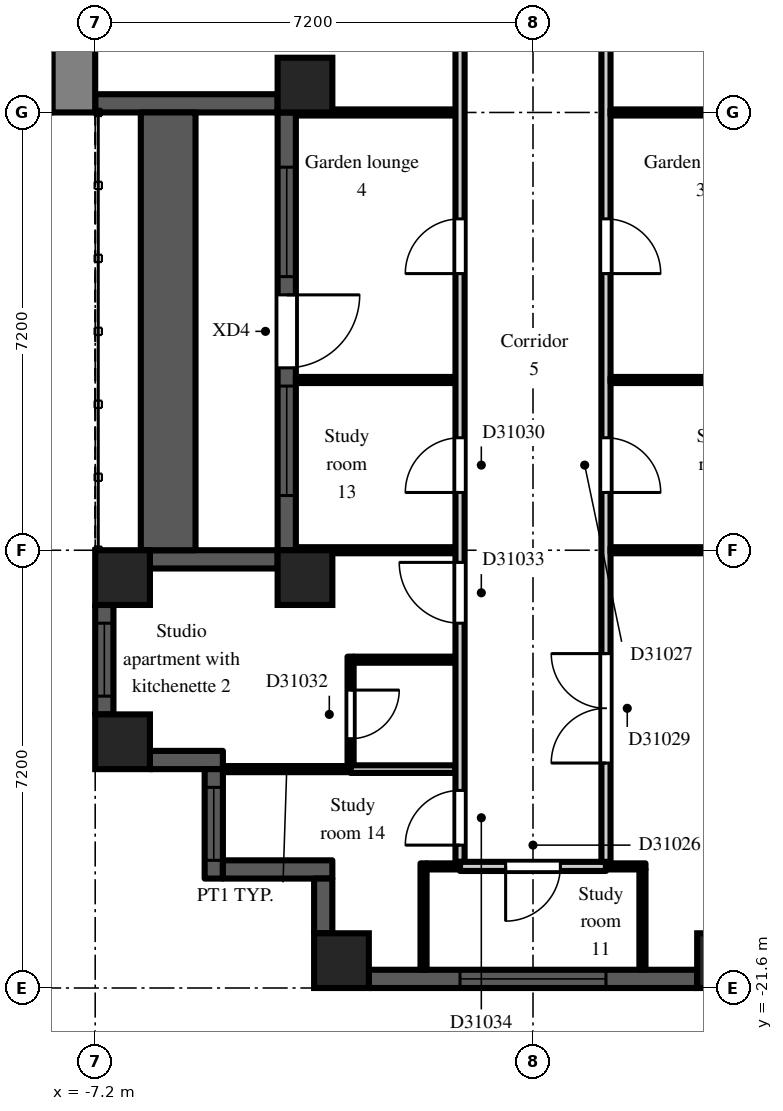
"""IFC4 building model, lengths in metres.
Left out: names, types, materials, properties, quantities, classifications, styles, units other than length and angle.
Written with IfcOpenShell. Run it as: python <this file> out.ifc"""

import sys

from ifc_helpers import new_model, si_unit, direction, frame, frame_2d, origin, origin_2d, place, context, subcontext, project, spatial, rectangle, extrude, element, fill, save


model = new_model("IFC4")
c1 = context("Model", 3, precision=1e-05, world=origin(), true_north=direction((0.0, 1.0)))
c2 = subcontext(c1, "Body", "Model", "MODEL_VIEW")
j1 = project(units=[si_unit("LENGTHUNIT", "METRE"), si_unit("PLANEANGLEUNIT", "RADIAN")], contexts=[c1])
p1 = place(None, origin())
s1 = spatial("IfcSite", under=j1, at=p1, CompositionType="ELEMENT")
p2 = place(p1, origin())
s2 = spatial("IfcBuilding", under=s1, at=p2, CompositionType="ELEMENT")
p3 = place(p2, frame((0.0, 0.0, 216.9)))
s3 = spatial("IfcBuildingStorey", under=s2, at=p3, CompositionType="ELEMENT", Elevation=216.9)
for number, where, z_axis, x_axis in (
    (1, (-6.75, -17.55, 0.0), (0.0, 0.0, 1.0), (1.0, 0.0, 0.0)),
    (2, (-6.75, -14.85, 0.0), (0.0, 0.0, 1.0), (1.0, 0.0, 0.0)),
    (3, (-3.75, -14.85, 0.0), (0.0, 0.0, 1.0), (1.0, 0.0, 0.0)),
    (4, (-3.75, -6.75, 0.0), (0.0, 0.0, 1.0), (1.0, 0.0, 0.0)),
    (5, (-3.15, -21.15, 0.0), (0.0, 0.0, 1.0), (1.0, 0.0, 0.0)),
    (6, (3.15, -21.15, 0.0), (0.0, 0.0, 1.0), (1.0, 0.0, 0.0)),
):
    element("IfcColumn", number, at=place(p3, frame(where, z_axis=z_axis, x_axis=x_axis)), inside=s3, PredefinedType="COLUMN", context=c2, shape_type="SweptSolid", body=[
        extrude(rectangle(XDim=0.9, YDim=0.9, at=origin_2d()), origin(), (0.0, 0.0, 1.0), 3.0),
    ])
p4 = place(p3, frame((-7.2, -7.05, 0.0), z_axis=(0.0, 0.0, 1.0), x_axis=(1.0, 0.0, 0.0)))
e7 = element("IfcWall", 7, at=p4, inside=s3, PredefinedType="SOLIDWALL", context=c2, shape_type="SweptSolid", body=[
    extrude(rectangle(XDim=3.0, YDim=0.3, at=frame_2d((1.5, 0.0))), origin(), (0.0, 0.0, 1.0), 2.3),
])
p5 = place(p3, frame((-4.05, -7.2, 0.0), z_axis=(0.0, 0.0, 1.0), x_axis=(0.0, -1.0, 0.0)))
e8 = element("IfcWall", 8, at=p5, inside=s3, PredefinedType="SOLIDWALL", context=c2, shape_type="SweptSolid", body=[
    extrude(rectangle(XDim=7.2, YDim=0.3, at=frame_2d((3.6, 0.0))), origin(), (0.0, 0.0, 1.0), 2.3),
])
p6 = place(p5, frame((3.0, 0.0, 0.0)))
e9 = element("IfcOpeningElement", 9, at=p6, cuts=e8, PredefinedType="OPENING", context=c2, shape_type="SweptSolid", body=[
    extrude(rectangle(XDim=1.2, YDim=2.05, at=frame_2d((0.6, 1.025))), frame((0.0, 0.16, 0.0), z_axis=(0.0, -1.0, 0.0), x_axis=(1.0, 0.0, 0.0)), (0.0, 0.0, 1.0), 0.32),
])
p7 = place(p5, frame((0.9, 0.0, 0.2)))
e10 = element("IfcOpeningElement", 10, at=p7, cuts=e8, PredefinedType="OPENING", context=c2, shape_type="SweptSolid", body=[
    extrude(rectangle(XDim=1.8, YDim=1.85, at=frame_2d((0.9, 0.925))), frame((0.0, 0.16, 0.0), z_axis=(0.0, -1.0, 0.0), x_axis=(1.0, 0.0, 0.0)), (0.0, 0.0, 1.0), 0.32),
])
p8 = place(p5, frame((4.5, 0.0, 0.2)))
e11 = element("IfcOpeningElement", 11, at=p8, cuts=e8, PredefinedType="OPENING", context=c2, shape_type="SweptSolid", body=[
    extrude(rectangle(XDim=1.8, YDim=1.85, at=frame_2d((0.9, 0.925))), frame((0.0, 0.16, 0.0), z_axis=(0.0, -1.0, 0.0), x_axis=(1.0, 0.0, 0.0)), (0.0, 0.0, 1.0), 0.32),
])
p9 = place(p3, frame((-4.2, -14.55, 0.0), z_axis=(0.0, 0.0, 1.0), x_axis=(-1.0, 0.0, 0.0)))
e12 = element("IfcWall", 12, at=p9, inside=s3, PredefinedType="SOLIDWALL", context=c2, shape_type="SweptSolid", body=[
    extrude(rectangle(XDim=2.1, YDim=0.3, at=frame_2d((1.05, 0.0))), origin(), (0.0, 0.0, 1.0), 2.3),
])
p10 = place(p3, frame((-7.05, -15.3, 0.0), z_axis=(0.0, 0.0, 1.0), x_axis=(0.0, -1.0, 0.0)))
e13 = element("IfcWall", 13, at=p10, inside=s3, PredefinedType="SOLIDWALL", context=c2, shape_type="SweptSolid", body=[
    extrude(rectangle(XDim=1.8, YDim=0.3, at=frame_2d((0.9, 0.0))), origin(), (0.0, 0.0, 1.0), 2.3),
])
p11 = place(p10, frame((0.3, 0.0, 0.2)))
e14 = element("IfcOpeningElement", 14, at=p11, cuts=e13, PredefinedType="OPENING", context=c2, shape_type="SweptSolid", body=[
    extrude(rectangle(XDim=1.2, YDim=1.85, at=frame_2d((0.6, 0.925))), frame((0.0, 0.16, 0.0), z_axis=(0.0, -1.0, 0.0), x_axis=(1.0, 0.0, 0.0)), (0.0, 0.0, 1.0), 0.32),
])
p12 = place(p3, frame((-6.3, -17.85, 0.0), z_axis=(0.0, 0.0, 1.0), x_axis=(1.0, 0.0, 0.0)))
e15 = element("IfcWall", 15, at=p12, inside=s3, PredefinedType="SOLIDWALL", context=c2, shape_type="SweptSolid", body=[
    extrude(rectangle(XDim=1.2, YDim=0.3, at=frame_2d((0.6, 0.0))), origin(), (0.0, 0.0, 1.0), 2.6),
])
p13 = place(p3, frame((-5.25, -18.0, 0.0), z_axis=(0.0, 0.0, 1.0), x_axis=(0.0, -1.0, 0.0)))
e16 = element("IfcWall", 16, at=p13, inside=s3, PredefinedType="SOLIDWALL", context=c2, shape_type="SweptSolid", body=[
    extrude(rectangle(XDim=1.8, YDim=0.3, at=frame_2d((0.9, 0.0))), origin(), (0.0, 0.0, 1.0), 2.6),
])
p14 = place(p13, frame((0.3, 0.0, 0.2)))
e17 = element("IfcOpeningElement", 17, at=p14, cuts=e16, PredefinedType="OPENING", context=c2, shape_type="SweptSolid", body=[
    extrude(rectangle(XDim=1.2, YDim=1.85, at=frame_2d((0.6, 0.925))), frame((0.0, 0.16, 0.0), z_axis=(0.0, -1.0, 0.0), x_axis=(1.0, 0.0, 0.0)), (0.0, 0.0, 1.0), 0.32),
])
p15 = place(p3, frame((-5.1, -19.65, 0.0), z_axis=(0.0, 0.0, 1.0), x_axis=(1.0, 0.0, 0.0)))
e18 = element("IfcWall", 18, at=p15, inside=s3, PredefinedType="SOLIDWALL", context=c2, shape_type="SweptSolid", body=[
    extrude(rectangle(XDim=1.8, YDim=0.3, at=frame_2d((0.9, 0.0))), origin(), (0.0, 0.0, 1.0), 2.6),
])
p16 = place(p3, frame((-3.45, -19.8, 0.0), z_axis=(0.0, 0.0, 1.0), x_axis=(0.0, -1.0, 0.0)))
e19 = element("IfcWall", 19, at=p16, inside=s3, PredefinedType="SOLIDWALL", context=c2, shape_type="SweptSolid", body=[
    extrude(rectangle(XDim=0.9, YDim=0.3, at=frame_2d((0.45, 0.0))), origin(), (0.0, 0.0, 1.0), 2.6),
])
p17 = place(p3, frame((-2.7, -21.45, 0.0), z_axis=(0.0, 0.0, 1.0), x_axis=(1.0, 0.0, 0.0)))
e20 = element("IfcWall", 20, at=p17, inside=s3, PredefinedType="SOLIDWALL", context=c2, shape_type="SweptSolid", body=[
    extrude(rectangle(XDim=5.4, YDim=0.3, at=frame_2d((2.7, 0.0))), origin(), (0.0, 0.0, 1.0), 2.3),
])
p18 = place(p17, frame((1.5, 0.0, 0.2)))
e21 = element("IfcOpeningElement", 21, at=p18, cuts=e20, PredefinedType="OPENING", context=c2, shape_type="SweptSolid", body=[
    extrude(rectangle(XDim=2.4, YDim=1.85, at=frame_2d((1.2, 0.925))), frame((0.0, 0.16, 0.0), z_axis=(0.0, -1.0, 0.0), x_axis=(1.0, 0.0, 0.0)), (0.0, 0.0, 1.0), 0.32),
])
p19 = place(p3, frame((-6.0, -14.4, 0.0), z_axis=(0.0, 0.0, 1.0), x_axis=(0.0, 1.0, 0.0)))
e22 = element("IfcWall", 22, at=p19, inside=s3, PredefinedType="PARAPET", context=c2, shape_type="SweptSolid", body=[
    extrude(rectangle(XDim=7.2, YDim=0.9, at=frame_2d((3.6, 0.0))), origin(), (0.0, 0.0, 1.0), 0.8),
])
p20 = place(p3, frame((-7.55, -7.2, 0.0), z_axis=(0.0, 0.0, 1.0), x_axis=(0.0, 1.0, 0.0)))
e23 = element("IfcWall", 23, at=p20, inside=s3, PredefinedType="SHEAR", context=c2, shape_type="SweptSolid", body=[
    extrude(rectangle(XDim=14.4, YDim=0.7, at=frame_2d((7.2, 0.0))), origin(), (0.0, 0.0, 1.0), 2.6),
])
p21 = place(p20, frame((6.0, 0.0, 0.0)))
e24 = element("IfcOpeningElement", 24, at=p21, cuts=e23, PredefinedType="OPENING", context=c2, shape_type="SweptSolid", body=[
    extrude(rectangle(XDim=2.4, YDim=2.2, at=frame_2d((1.2, 1.1))), frame((0.0, 0.36, 0.0), z_axis=(0.0, -1.0, 0.0), x_axis=(1.0, 0.0, 0.0)), (0.0, 0.0, 1.0), 0.72),
])
p22 = place(p3, frame((-5.1, -18.0, 0.0), z_axis=(0.0, 0.0, 1.0), x_axis=(1.0, 0.0, 0.0)))
e25 = element("IfcWall", 25, at=p22, inside=s3, PredefinedType="PARTITIONING", context=c2, shape_type="SweptSolid", body=[
    extrude(rectangle(XDim=2.1, YDim=0.1, at=frame_2d((1.05, 0.0))), origin(), (0.0, 0.0, 1.0), 2.6),
])
for number, where, z_axis, x_axis in (
    (26, (-3.9, -14.4, 0.0), (0.0, 0.0, 1.0), (1.0, 0.0, 0.0)),
    (27, (-3.9, -11.6, 0.0), (0.0, 0.0, 1.0), (1.0, 0.0, 0.0)),
    (28, (-3.9, -7.2, 0.0), (0.0, 0.0, 1.0), (1.0, 0.0, 0.0)),
):
    element("IfcWall", number, at=place(p3, frame(where, z_axis=z_axis, x_axis=x_axis)), inside=s3, PredefinedType="PARTITIONING", context=c2, shape_type="SweptSolid", body=[
        extrude(rectangle(XDim=2.625, YDim=0.1, at=frame_2d((1.312, 0.0))), origin(), (0.0, 0.0, 1.0), 2.6),
    ])
p23 = place(p3, frame((-3.0, -17.938, 0.0), z_axis=(0.0, 0.0, 1.0), x_axis=(0.0, 1.0, 0.0)))
e29 = element("IfcWall", 29, at=p23, inside=s3, PredefinedType="PARTITIONING", context=c2, shape_type="SweptSolid", body=[
    extrude(rectangle(XDim=1.788, YDim=0.1, at=frame_2d((0.894, 0.0))), origin(), (0.0, 0.0, 1.0), 2.6),
])
p24 = place(p23, frame((0.438, 0.0, 0.0)))
e30 = element("IfcOpeningElement", 30, at=p24, cuts=e29, PredefinedType="OPENING", context=c2, shape_type="SweptSolid", body=[
    extrude(rectangle(XDim=0.8, YDim=2.1, at=frame_2d((0.4, 1.05))), frame((0.0, 0.06, 0.0), z_axis=(0.0, -1.0, 0.0), x_axis=(1.0, 0.0, 0.0)), (0.0, 0.0, 1.0), 0.12),
])
p25 = place(p3, frame((-3.0, -18.0, 0.0), z_axis=(0.0, 0.0, 1.0), x_axis=(1.0, 0.0, 0.0)))
e31 = element("IfcWall", 31, at=p25, inside=s3, PredefinedType="PARTITIONING", context=c2, shape_type="SweptSolid", body=[
    extrude(rectangle(XDim=1.725, YDim=0.125, at=frame_2d((0.863, 0.0))), origin(), (0.0, 0.0, 1.0), 2.6),
])
p26 = place(p3, frame((-2.95, -16.2, 0.0), z_axis=(0.0, 0.0, 1.0), x_axis=(1.0, 0.0, 0.0)))
e32 = element("IfcWall", 32, at=p26, inside=s3, PredefinedType="PARTITIONING", context=c2, shape_type="SweptSolid", body=[
    extrude(rectangle(XDim=1.675, YDim=0.1, at=frame_2d((0.837, 0.0))), origin(), (0.0, 0.0, 1.0), 2.6),
])
p27 = place(p3, frame((-1.8, -21.3, 0.0), z_axis=(0.0, 0.0, 1.0), x_axis=(0.0, 1.0, 0.0)))
e33 = element("IfcWall", 33, at=p27, inside=s3, PredefinedType="PARTITIONING", context=c2, shape_type="SweptSolid", body=[
    extrude(rectangle(XDim=1.75, YDim=0.1, at=frame_2d((0.875, 0.0))), origin(), (0.0, 0.0, 1.0), 2.6),
])
p28 = place(p3, frame((-1.75, -19.6, 0.0), z_axis=(0.0, 0.0, 1.0), x_axis=(1.0, 0.0, 0.0)))
e34 = element("IfcWall", 34, at=p28, inside=s3, PredefinedType="PARTITIONING", context=c2, shape_type="SweptSolid", body=[
    extrude(rectangle(XDim=0.55, YDim=0.1, at=frame_2d((0.275, 0.0))), origin(), (0.0, 0.0, 1.0), 2.6),
])
p29 = place(p3, frame((-1.2, -19.525, 0.0), z_axis=(0.0, 0.0, 1.0), x_axis=(0.0, 1.0, 0.0)))
e35 = element("IfcWall", 35, at=p29, inside=s3, PredefinedType="PARTITIONING", context=c2, shape_type="SweptSolid", body=[
    extrude(rectangle(XDim=18.25, YDim=0.15, at=frame_2d((9.125, 0.0))), origin(), (0.0, 0.0, 1.0), 2.6),
])
p30 = place(p29, frame((13.375, 0.0, 0.0)))
e36 = element("IfcOpeningElement", 36, at=p30, cuts=e35, PredefinedType="OPENING", context=c2, shape_type="SweptSolid", body=[
    extrude(rectangle(XDim=0.9, YDim=2.1, at=frame_2d((0.45, 1.05))), frame((0.0, 0.085, 0.0), z_axis=(0.0, -1.0, 0.0), x_axis=(1.0, 0.0, 0.0)), (0.0, 0.0, 1.0), 0.17),
])
p31 = place(p29, frame((6.075, 0.0, 0.0)))
e37 = element("IfcOpeningElement", 37, at=p31, cuts=e35, PredefinedType="OPENING", context=c2, shape_type="SweptSolid", body=[
    extrude(rectangle(XDim=0.9, YDim=2.1, at=frame_2d((0.45, 1.05))), frame((0.0, 0.085, 0.0), z_axis=(0.0, -1.0, 0.0), x_axis=(1.0, 0.0, 0.0)), (0.0, 0.0, 1.0), 0.17),
])
p32 = place(p29, frame((9.675, 0.0, 0.0)))
e38 = element("IfcOpeningElement", 38, at=p32, cuts=e35, PredefinedType="OPENING", context=c2, shape_type="SweptSolid", body=[
    extrude(rectangle(XDim=0.9, YDim=2.1, at=frame_2d((0.45, 1.05))), frame((0.0, 0.085, 0.0), z_axis=(0.0, -1.0, 0.0), x_axis=(1.0, 0.0, 0.0)), (0.0, 0.0, 1.0), 0.17),
])
p33 = place(p29, frame((3.925, 0.0, 0.0)))
e39 = element("IfcOpeningElement", 39, at=p33, cuts=e35, PredefinedType="OPENING", context=c2, shape_type="SweptSolid", body=[
    extrude(rectangle(XDim=1.0, YDim=2.1, at=frame_2d((0.5, 1.05))), frame((0.0, 0.085, 0.0), z_axis=(0.0, -1.0, 0.0), x_axis=(1.0, 0.0, 0.0)), (0.0, 0.0, 1.0), 0.17),
])
p34 = place(p29, frame((0.275, 0.0, 0.0)))
e40 = element("IfcOpeningElement", 40, at=p34, cuts=e35, PredefinedType="OPENING", context=c2, shape_type="SweptSolid", body=[
    extrude(rectangle(XDim=0.9, YDim=2.1, at=frame_2d((0.45, 1.05))), frame((0.0, 0.085, 0.0), z_axis=(0.0, -1.0, 0.0), x_axis=(1.0, 0.0, 0.0)), (0.0, 0.0, 1.0), 0.17),
])
p35 = place(p3, frame((-1.2, -19.6, 0.0), z_axis=(0.0, 0.0, 1.0), x_axis=(1.0, 0.0, 0.0)))
e41 = element("IfcWall", 41, at=p35, inside=s3, PredefinedType="PARTITIONING", context=c2, shape_type="SweptSolid", body=[
    extrude(rectangle(XDim=2.4, YDim=0.15, at=frame_2d((1.2, 0.0))), origin(), (0.0, 0.0, 1.0), 2.6),
])
p36 = place(p35, frame((0.75, 0.0, 0.0)))
e42 = element("IfcOpeningElement", 42, at=p36, cuts=e41, PredefinedType="OPENING", context=c2, shape_type="SweptSolid", body=[
    extrude(rectangle(XDim=0.9, YDim=2.1, at=frame_2d((0.45, 1.05))), frame((0.0, 0.085, 0.0), z_axis=(0.0, -1.0, 0.0), x_axis=(1.0, 0.0, 0.0)), (0.0, 0.0, 1.0), 0.17),
])
p37 = place(p3, frame((1.2, -19.525, 0.0), z_axis=(0.0, 0.0, 1.0), x_axis=(0.0, 1.0, 0.0)))
e43 = element("IfcWall", 43, at=p37, inside=s3, PredefinedType="PARTITIONING", context=c2, shape_type="SweptSolid", body=[
    extrude(rectangle(XDim=18.4, YDim=0.15, at=frame_2d((9.2, 0.0))), origin(), (0.0, 0.0, 1.0), 2.6),
])
p38 = place(p37, frame((14.875, 0.0, 0.0)))
e44 = element("IfcOpeningElement", 44, at=p38, cuts=e43, PredefinedType="OPENING", context=c2, shape_type="SweptSolid", body=[
    extrude(rectangle(XDim=0.9, YDim=2.1, at=frame_2d((0.45, 1.05))), frame((0.0, 0.085, 0.0), z_axis=(0.0, -1.0, 0.0), x_axis=(1.0, 0.0, 0.0)), (0.0, 0.0, 1.0), 0.17),
])
p39 = place(p37, frame((6.075, 0.0, 0.0)))
e45 = element("IfcOpeningElement", 45, at=p39, cuts=e43, PredefinedType="OPENING", context=c2, shape_type="SweptSolid", body=[
    extrude(rectangle(XDim=0.9, YDim=2.1, at=frame_2d((0.45, 1.05))), frame((0.0, 0.085, 0.0), z_axis=(0.0, -1.0, 0.0), x_axis=(1.0, 0.0, 0.0)), (0.0, 0.0, 1.0), 0.17),
])
p40 = place(p37, frame((9.675, 0.0, 0.0)))
e46 = element("IfcOpeningElement", 46, at=p40, cuts=e43, PredefinedType="OPENING", context=c2, shape_type="SweptSolid", body=[
    extrude(rectangle(XDim=0.9, YDim=2.1, at=frame_2d((0.45, 1.05))), frame((0.0, 0.085, 0.0), z_axis=(0.0, -1.0, 0.0), x_axis=(1.0, 0.0, 0.0)), (0.0, 0.0, 1.0), 0.17),
])
p41 = place(p37, frame((1.625, 0.0, 0.0)))
e47 = element("IfcOpeningElement", 47, at=p41, cuts=e43, PredefinedType="OPENING", context=c2, shape_type="SweptSolid", body=[
    extrude(rectangle(XDim=1.8, YDim=2.1, at=frame_2d((0.9, 1.05))), frame((0.0, 0.085, 0.0), z_axis=(0.0, -1.0, 0.0), x_axis=(1.0, 0.0, 0.0)), (0.0, 0.0, 1.0), 0.17),
])
p42 = place(p3, frame((1.2, -19.6, 0.0), z_axis=(0.0, 0.0, 1.0), x_axis=(1.0, 0.0, 0.0)))
e48 = element("IfcWall", 48, at=p42, inside=s3, PredefinedType="PARTITIONING", context=c2, shape_type="SweptSolid", body=[
    extrude(rectangle(XDim=0.65, YDim=0.1, at=frame_2d((0.325, 0.0))), origin(), (0.0, 0.0, 1.0), 2.6),
])
for number, where, z_axis, x_axis in (
    (49, (1.275, -14.4, 0.0), (0.0, 0.0, 1.0), (1.0, 0.0, 0.0)),
    (50, (1.275, -11.6, 0.0), (0.0, 0.0, 1.0), (1.0, 0.0, 0.0)),
    (51, (1.275, -7.2, 0.0), (0.0, 0.0, 1.0), (1.0, 0.0, 0.0)),
):
    element("IfcWall", number, at=place(p3, frame(where, z_axis=z_axis, x_axis=x_axis)), inside=s3, PredefinedType="PARTITIONING", context=c2, shape_type="SweptSolid", body=[
        extrude(rectangle(XDim=2.625, YDim=0.1, at=frame_2d((1.312, 0.0))), origin(), (0.0, 0.0, 1.0), 2.6),
    ])
p43 = place(p3, frame((1.8, -21.3, 0.0), z_axis=(0.0, 0.0, 1.0), x_axis=(0.0, 1.0, 0.0)))
e52 = element("IfcWall", 52, at=p43, inside=s3, PredefinedType="PARTITIONING", context=c2, shape_type="SweptSolid", body=[
    extrude(rectangle(XDim=1.65, YDim=0.1, at=frame_2d((0.825, 0.0))), origin(), (0.0, 0.0, 1.0), 2.6),
])
p44 = place(p6, origin())
e53 = element("IfcDoor", 53, at=p44, inside=s3, OperationType="SINGLE_SWING_LEFT", PredefinedType="DOOR", context=c2, shape_type="SweptSolid", body=[
    extrude(rectangle(XDim=1.2, YDim=2.05, at=frame_2d((0.6, 1.025))), frame((0.0, 0.025, 0.0), z_axis=(0.0, -1.0, 0.0), x_axis=(1.0, 0.0, 0.0)), (0.0, 0.0, 1.0), 0.05),
])
fill(e9, e53)
p45 = place(p7, origin())
e54 = element("IfcWindow", 54, at=p45, inside=s3, PartitioningType="SINGLE_PANEL", PredefinedType="WINDOW", context=c2, shape_type="SweptSolid", body=[
    extrude(rectangle(XDim=1.8, YDim=1.85, at=frame_2d((0.9, 0.925))), frame((0.0, 0.03, 0.0), z_axis=(0.0, -1.0, 0.0), x_axis=(1.0, 0.0, 0.0)), (0.0, 0.0, 1.0), 0.06),
])
fill(e10, e54)
p46 = place(p8, origin())
e55 = element("IfcWindow", 55, at=p46, inside=s3, PartitioningType="SINGLE_PANEL", PredefinedType="WINDOW", context=c2, shape_type="SweptSolid", body=[
    extrude(rectangle(XDim=1.8, YDim=1.85, at=frame_2d((0.9, 0.925))), frame((0.0, 0.03, 0.0), z_axis=(0.0, -1.0, 0.0), x_axis=(1.0, 0.0, 0.0)), (0.0, 0.0, 1.0), 0.06),
])
fill(e11, e55)
p47 = place(p11, origin())
e56 = element("IfcWindow", 56, at=p47, inside=s3, PartitioningType="SINGLE_PANEL", PredefinedType="WINDOW", context=c2, shape_type="SweptSolid", body=[
    extrude(rectangle(XDim=1.2, YDim=1.85, at=frame_2d((0.6, 0.925))), frame((0.0, 0.03, 0.0), z_axis=(0.0, -1.0, 0.0), x_axis=(1.0, 0.0, 0.0)), (0.0, 0.0, 1.0), 0.06),
])
fill(e14, e56)
p48 = place(p14, origin())
e57 = element("IfcWindow", 57, at=p48, inside=s3, PartitioningType="SINGLE_PANEL", PredefinedType="WINDOW", context=c2, shape_type="SweptSolid", body=[
    extrude(rectangle(XDim=1.2, YDim=1.85, at=frame_2d((0.6, 0.925))), frame((0.0, 0.03, 0.0), z_axis=(0.0, -1.0, 0.0), x_axis=(1.0, 0.0, 0.0)), (0.0, 0.0, 1.0), 0.06),
])
fill(e17, e57)
p49 = place(p18, origin())
e58 = element("IfcWindow", 58, at=p49, inside=s3, PartitioningType="SINGLE_PANEL", PredefinedType="WINDOW", context=c2, shape_type="SweptSolid", body=[
    extrude(rectangle(XDim=2.4, YDim=1.85, at=frame_2d((1.2, 0.925))), frame((0.0, 0.03, 0.0), z_axis=(0.0, -1.0, 0.0), x_axis=(1.0, 0.0, 0.0)), (0.0, 0.0, 1.0), 0.06),
])
fill(e21, e58)
p50 = place(p36, frame((0.9, 0.0, 0.0), z_axis=(0.0, 0.0, 1.0), x_axis=(-1.0, 0.0, 0.0)))
e59 = element("IfcDoor", 59, at=p50, inside=s3, OperationType="SINGLE_SWING_RIGHT", PredefinedType="DOOR", context=c2, shape_type="SweptSolid", body=[
    extrude(rectangle(XDim=0.9, YDim=2.1, at=frame_2d((0.45, 1.05))), frame((0.0, 0.025, 0.0), z_axis=(0.0, -1.0, 0.0), x_axis=(1.0, 0.0, 0.0)), (0.0, 0.0, 1.0), 0.05),
])
fill(e42, e59)
p51 = place(p39, frame((0.9, 0.0, 0.0), z_axis=(0.0, 0.0, 1.0), x_axis=(-1.0, 0.0, 0.0)))
e60 = element("IfcDoor", 60, at=p51, inside=s3, OperationType="SINGLE_SWING_RIGHT", PredefinedType="DOOR", context=c2, shape_type="SweptSolid", body=[
    extrude(rectangle(XDim=0.9, YDim=2.1, at=frame_2d((0.45, 1.05))), frame((0.0, 0.025, 0.0), z_axis=(0.0, -1.0, 0.0), x_axis=(1.0, 0.0, 0.0)), (0.0, 0.0, 1.0), 0.05),
])
fill(e45, e60)
p52 = place(p40, frame((0.9, 0.0, 0.0), z_axis=(0.0, 0.0, 1.0), x_axis=(-1.0, 0.0, 0.0)))
e61 = element("IfcDoor", 61, at=p52, inside=s3, OperationType="SINGLE_SWING_RIGHT", PredefinedType="DOOR", context=c2, shape_type="SweptSolid", body=[
    extrude(rectangle(XDim=0.9, YDim=2.1, at=frame_2d((0.45, 1.05))), frame((0.0, 0.025, 0.0), z_axis=(0.0, -1.0, 0.0), x_axis=(1.0, 0.0, 0.0)), (0.0, 0.0, 1.0), 0.05),
])
fill(e46, e61)
p53 = place(p41, origin())
e62 = element("IfcDoor", 62, at=p53, inside=s3, OperationType="DOUBLE_DOOR_DOUBLE_SWING", PredefinedType="DOOR", context=c2, shape_type="SweptSolid", body=[
    extrude(rectangle(XDim=1.8, YDim=2.1, at=frame_2d((0.9, 1.05))), frame((0.0, 0.025, 0.0), z_axis=(0.0, -1.0, 0.0), x_axis=(1.0, 0.0, 0.0)), (0.0, 0.0, 1.0), 0.05),
])
fill(e47, e62)
p54 = place(p31, origin())
e63 = element("IfcDoor", 63, at=p54, inside=s3, OperationType="SINGLE_SWING_LEFT", PredefinedType="DOOR", context=c2, shape_type="SweptSolid", body=[
    extrude(rectangle(XDim=0.9, YDim=2.1, at=frame_2d((0.45, 1.05))), frame((0.0, 0.025, 0.0), z_axis=(0.0, -1.0, 0.0), x_axis=(1.0, 0.0, 0.0)), (0.0, 0.0, 1.0), 0.05),
])
fill(e37, e63)
p55 = place(p32, origin())
e64 = element("IfcDoor", 64, at=p55, inside=s3, OperationType="SINGLE_SWING_LEFT", PredefinedType="DOOR", context=c2, shape_type="SweptSolid", body=[
    extrude(rectangle(XDim=0.9, YDim=2.1, at=frame_2d((0.45, 1.05))), frame((0.0, 0.025, 0.0), z_axis=(0.0, -1.0, 0.0), x_axis=(1.0, 0.0, 0.0)), (0.0, 0.0, 1.0), 0.05),
])
fill(e38, e64)
p56 = place(p24, frame((0.8, 0.0, 0.0), z_axis=(0.0, 0.0, 1.0), x_axis=(-1.0, 0.0, 0.0)))
e65 = element("IfcDoor", 65, at=p56, inside=s3, OperationType="SINGLE_SWING_LEFT", PredefinedType="DOOR", context=c2, shape_type="SweptSolid", body=[
    extrude(rectangle(XDim=0.8, YDim=2.1, at=frame_2d((0.4, 1.05))), frame((0.0, 0.025, 0.0), z_axis=(0.0, -1.0, 0.0), x_axis=(1.0, 0.0, 0.0)), (0.0, 0.0, 1.0), 0.05),
])
fill(e30, e65)
p57 = place(p33, origin())
e66 = element("IfcDoor", 66, at=p57, inside=s3, OperationType="SINGLE_SWING_RIGHT", PredefinedType="DOOR", context=c2, shape_type="SweptSolid", body=[
    extrude(rectangle(XDim=1.0, YDim=2.1, at=frame_2d((0.5, 1.05))), frame((0.0, 0.025, 0.0), z_axis=(0.0, -1.0, 0.0), x_axis=(1.0, 0.0, 0.0)), (0.0, 0.0, 1.0), 0.05),
])
fill(e39, e66)
p58 = place(p34, origin())
e67 = element("IfcDoor", 67, at=p58, inside=s3, OperationType="SINGLE_SWING_LEFT", PredefinedType="DOOR", context=c2, shape_type="SweptSolid", body=[
    extrude(rectangle(XDim=0.9, YDim=2.1, at=frame_2d((0.45, 1.05))), frame((0.0, 0.025, 0.0), z_axis=(0.0, -1.0, 0.0), x_axis=(1.0, 0.0, 0.0)), (0.0, 0.0, 1.0), 0.05),
])
fill(e40, e67)
save(model, sys.argv[1])
